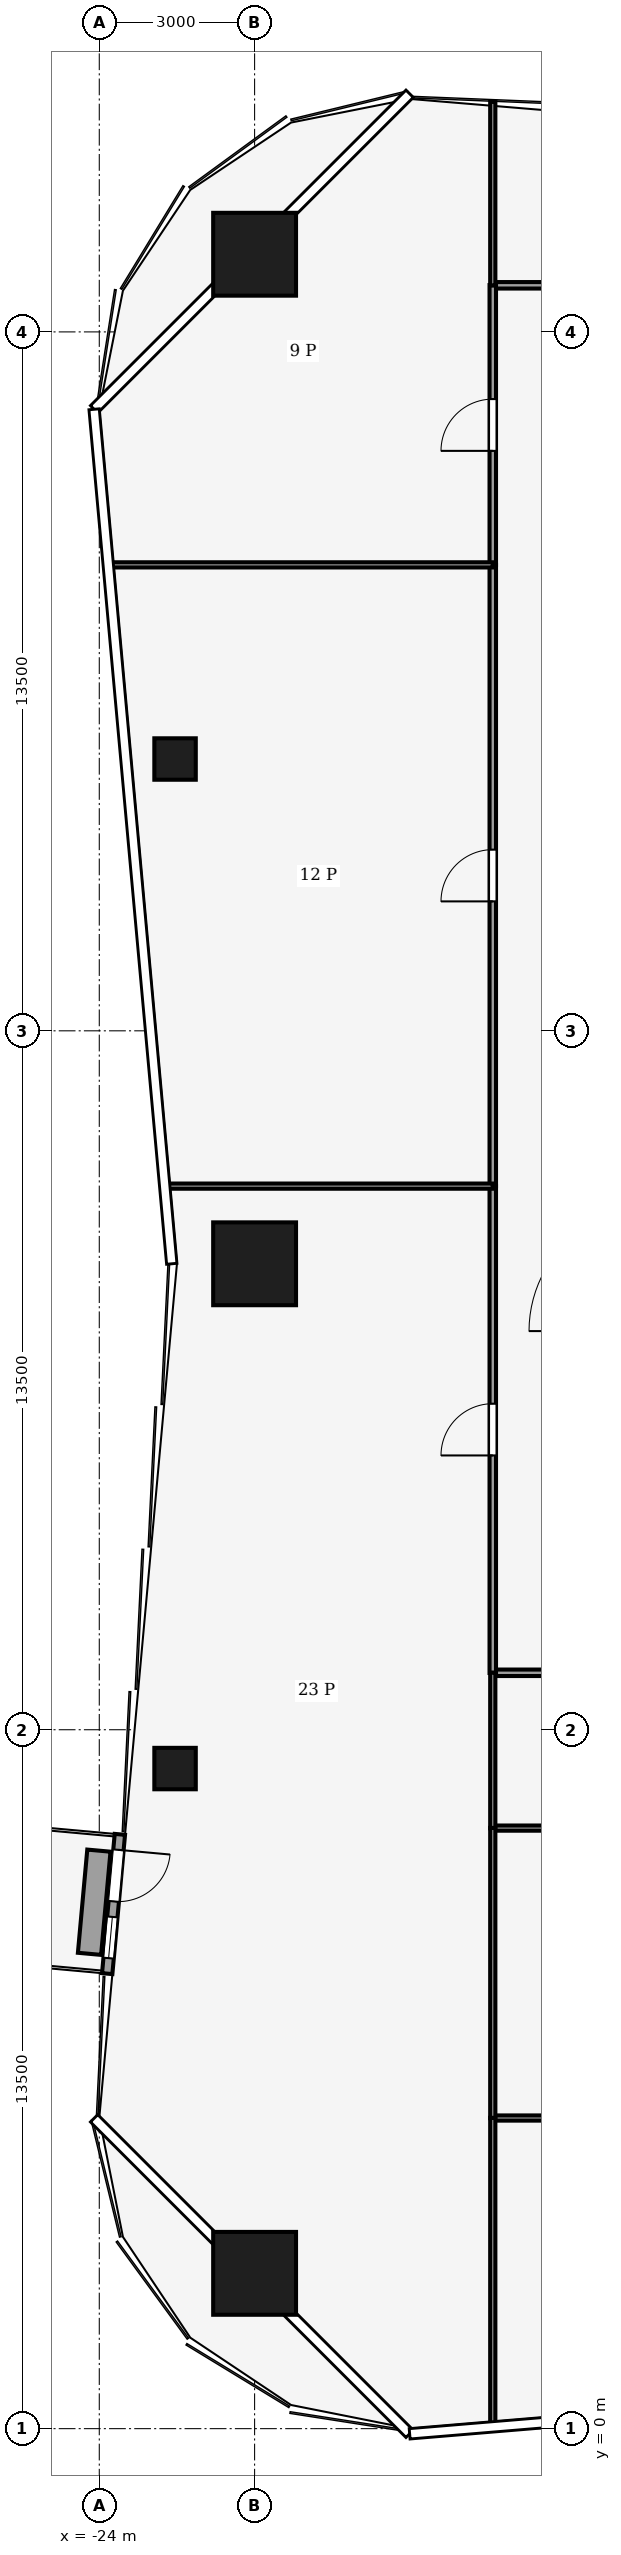
"""IFC4 building model, lengths in metres.
Left out: names, types, materials, properties, quantities, classifications, styles, units other than length and angle.
Written with IfcOpenShell. Run it as: python <this file> out.ifc"""

import sys

from ifc_helpers import new_model, si_unit, direction, frame, frame_2d, origin, origin_2d, place, context, subcontext, project, spatial, rectangle, hollow_rectangle, extrude, element, fill, save


model = new_model("IFC4")
c1 = context("Model", 3, precision=1e-05, world=origin(), true_north=direction((0.0, 1.0)))
c2 = subcontext(c1, "Body", "Model", "MODEL_VIEW")
j1 = project(units=[si_unit("LENGTHUNIT", "METRE"), si_unit("PLANEANGLEUNIT", "RADIAN")], contexts=[c1])
p1 = place(None, origin())
s1 = spatial("IfcSite", under=j1, at=p1, CompositionType="ELEMENT")
p2 = place(p1, origin())
s2 = spatial("IfcBuilding", under=s1, at=p2, CompositionType="ELEMENT")
p3 = place(p2, frame((0.0, 0.0, 34.0)))
s3 = spatial("IfcBuildingStorey", under=s2, at=p3, CompositionType="ELEMENT", Elevation=34.0)
for number, where, z_axis, x_axis in (
    (1, (-21.0, 42.0, 0.0), (0.0, 0.0, 1.0), (1.0, 0.0, 0.0)),
    (2, (-21.0, 3.0, 0.0), (0.0, 0.0, 1.0), (1.0, 0.0, 0.0)),
    (3, (-21.0, 22.5, 0.0), (0.0, 0.0, 1.0), (1.0, 0.0, 0.0)),
):
    element("IfcColumn", number, at=place(p3, frame(where, z_axis=z_axis, x_axis=x_axis)), inside=s3, PredefinedType="COLUMN", context=c2, shape_type="SweptSolid", body=[
        extrude(hollow_rectangle(XDim=1.6, YDim=1.6, WallThickness=0.09, at=origin_2d()), origin(), (0.0, 0.0, 1.0), 4.0),
    ])
for number, where, z_axis, x_axis in (
    (4, (-22.536, 12.75, 0.0), (0.0, 0.0, 1.0), (1.0, 0.0, 0.0)),
    (5, (-22.536, 32.25, 0.0), (0.0, 0.0, 1.0), (1.0, 0.0, 0.0)),
):
    element("IfcColumn", number, at=place(p3, frame(where, z_axis=z_axis, x_axis=x_axis)), inside=s3, PredefinedType="COLUMN", context=c2, shape_type="SweptSolid", body=[
        extrude(hollow_rectangle(XDim=0.8, YDim=0.8, WallThickness=0.04, at=origin_2d()), origin(), (0.0, 0.0, 1.0), 4.0),
    ])
p4 = place(p3, frame((-23.602, 11.479, 0.0), z_axis=(0.0, 0.0, 1.0), x_axis=(-0.090552042494, -0.995891724838, 0.0)))
e6 = element("IfcWall", 6, at=p4, inside=s3, PredefinedType="SOLIDWALL", context=c2, shape_type="SweptSolid", body=[
    extrude(rectangle(XDim=2.701, YDim=0.2, at=frame_2d((1.351, 0.0))), origin(), (0.0, 0.0, 1.0), 3.65),
])
p5 = place(p4, frame((0.3, 0.0, 0.0)))
e7 = element("IfcOpeningElement", 7, at=p5, cuts=e6, PredefinedType="OPENING", context=c2, shape_type="SweptSolid", body=[
    extrude(rectangle(XDim=1.0, YDim=2.1, at=frame_2d((0.5, 1.05))), frame((0.0, 0.11, 0.0), z_axis=(0.0, -1.0, 0.0), x_axis=(1.0, 0.0, 0.0)), (0.0, 0.0, 1.0), 0.22),
])
p6 = place(p4, frame((1.601, 0.0, 0.9)))
e8 = element("IfcOpeningElement", 8, at=p6, cuts=e6, PredefinedType="OPENING", context=c2, shape_type="SweptSolid", body=[
    extrude(rectangle(XDim=0.8, YDim=1.2, at=frame_2d((0.4, 0.6))), frame((0.0, 0.11, 0.0), z_axis=(0.0, -1.0, 0.0), x_axis=(1.0, 0.0, 0.0)), (0.0, 0.0, 1.0), 0.22),
])
p7 = place(p3, frame((-24.008, 11.165, 0.0), z_axis=(0.0, 0.0, 1.0), x_axis=(-0.090513748512, -0.995895205998, 0.0)))
e9 = element("IfcWall", 9, at=p7, inside=s3, PredefinedType="USERDEFINED", context=c2, shape_type="SweptSolid", body=[
    extrude(rectangle(XDim=2.001, YDim=0.45, at=frame_2d((1.001, 0.0))), origin(), (0.0, 0.0, 1.0), 0.4),
])
p8 = place(p3, frame((-9.0, 14.6, 0.0), z_axis=(0.0, 0.0, 1.0), x_axis=(-1.0, 0.0, 0.0)))
e10 = element("IfcWall", 10, at=p8, inside=s3, PredefinedType="PARTITIONING", context=c2, shape_type="SweptSolid", body=[
    extrude(rectangle(XDim=7.4, YDim=0.125, at=frame_2d((3.7, 0.0))), origin(), (0.0, 0.0, 1.0), 3.29),
])
p9 = place(p8, frame((3.2, 0.0, 0.0)))
e11 = element("IfcOpeningElement", 11, at=p9, cuts=e10, PredefinedType="OPENING", context=c2, shape_type="SweptSolid", body=[
    extrude(rectangle(XDim=1.0, YDim=2.1, at=frame_2d((0.5, 1.05))), frame((0.0, 0.073, 0.0), z_axis=(0.0, -1.0, 0.0), x_axis=(1.0, 0.0, 0.0)), (0.0, 0.0, 1.0), 0.145),
])
p10 = place(p3, frame((-16.4, 41.4, 0.0), z_axis=(0.0, 0.0, 1.0), x_axis=(1.0, 0.0, 0.0)))
e12 = element("IfcWall", 12, at=p10, inside=s3, PredefinedType="PARTITIONING", context=c2, shape_type="SweptSolid", body=[
    extrude(rectangle(XDim=10.4, YDim=0.125, at=frame_2d((5.2, 0.0))), origin(), (0.0, 0.0, 1.0), 3.54),
])
p11 = place(p10, frame((7.5, 0.0, 0.0)))
e13 = element("IfcOpeningElement", 13, at=p11, cuts=e12, PredefinedType="OPENING", context=c2, shape_type="SweptSolid", body=[
    extrude(rectangle(XDim=1.0, YDim=2.1, at=frame_2d((0.5, 1.05))), frame((0.0, 0.073, 0.0), z_axis=(0.0, -1.0, 0.0), x_axis=(1.0, 0.0, 0.0)), (0.0, 0.0, 1.0), 0.145),
])
p12 = place(p3, frame((-16.4, 14.596, 0.0), z_axis=(0.0, 0.0, 1.0), x_axis=(0.0, 1.0, 0.0)))
e14 = element("IfcWall", 14, at=p12, inside=s3, PredefinedType="PARTITIONING", context=c2, shape_type="SweptSolid", body=[
    extrude(rectangle(XDim=9.404, YDim=0.125, at=frame_2d((4.702, 0.0))), origin(), (0.0, 0.0, 1.0), 3.14),
])
p13 = place(p12, frame((4.202, 0.0, 0.0)))
e15 = element("IfcOpeningElement", 15, at=p13, cuts=e14, PredefinedType="OPENING", context=c2, shape_type="SweptSolid", body=[
    extrude(rectangle(XDim=1.0, YDim=2.1, at=frame_2d((0.5, 1.05))), frame((0.0, 0.073, 0.0), z_axis=(0.0, -1.0, 0.0), x_axis=(1.0, 0.0, 0.0)), (0.0, 0.0, 1.0), 0.145),
])
p14 = place(p3, frame((-16.4, 24.0, 0.0), z_axis=(0.0, 0.0, 1.0), x_axis=(0.0, 1.0, 0.0)))
e16 = element("IfcWall", 16, at=p14, inside=s3, PredefinedType="PARTITIONING", context=c2, shape_type="SweptSolid", body=[
    extrude(rectangle(XDim=12.0, YDim=0.125, at=frame_2d((6.0, 0.0))), origin(), (0.0, 0.0, 1.0), 3.48),
])
p15 = place(p14, frame((5.5, 0.0, 0.0)))
e17 = element("IfcOpeningElement", 17, at=p15, cuts=e16, PredefinedType="OPENING", context=c2, shape_type="SweptSolid", body=[
    extrude(rectangle(XDim=1.0, YDim=2.1, at=frame_2d((0.5, 1.05))), frame((0.0, 0.073, 0.0), z_axis=(0.0, -1.0, 0.0), x_axis=(1.0, 0.0, 0.0)), (0.0, 0.0, 1.0), 0.145),
])
p16 = place(p3, frame((-16.4, 36.0, 0.0), z_axis=(0.0, 0.0, 1.0), x_axis=(0.0, 1.0, 0.0)))
e18 = element("IfcWall", 18, at=p16, inside=s3, PredefinedType="PARTITIONING", context=c2, shape_type="SweptSolid", body=[
    extrude(rectangle(XDim=5.404, YDim=0.125, at=frame_2d((2.702, 0.0))), origin(), (0.0, 0.0, 1.0), 3.14),
])
p17 = place(p16, frame((2.202, 0.0, 0.0)))
e19 = element("IfcOpeningElement", 19, at=p17, cuts=e18, PredefinedType="OPENING", context=c2, shape_type="SweptSolid", body=[
    extrude(rectangle(XDim=1.0, YDim=2.1, at=frame_2d((0.5, 1.05))), frame((0.0, 0.073, 0.0), z_axis=(0.0, -1.0, 0.0), x_axis=(1.0, 0.0, 0.0)), (0.0, 0.0, 1.0), 0.145),
])
p18 = place(p3, frame((-8.996, 11.6, 0.0), z_axis=(0.0, 0.0, 1.0), x_axis=(-1.0, 0.0, 0.0)))
e20 = element("IfcWall", 20, at=p18, inside=s3, PredefinedType="PARTITIONING", context=c2, shape_type="SweptSolid", body=[
    extrude(rectangle(XDim=7.404, YDim=0.1, at=frame_2d((3.702, 0.0))), origin(), (0.0, 0.0, 1.0), 3.29),
])
p19 = place(p18, frame((3.202, 0.0, 0.0)))
e21 = element("IfcOpeningElement", 21, at=p19, cuts=e20, PredefinedType="OPENING", context=c2, shape_type="SweptSolid", body=[
    extrude(rectangle(XDim=1.0, YDim=2.1, at=frame_2d((0.5, 1.05))), frame((0.0, 0.06, 0.0), z_axis=(0.0, -1.0, 0.0), x_axis=(1.0, 0.0, 0.0)), (0.0, 0.0, 1.0), 0.12),
])
p20 = place(p3, frame((-16.4, 14.604, 0.0), z_axis=(0.0, 0.0, 1.0), x_axis=(0.0, -1.0, 0.0)))
e22 = element("IfcWall", 22, at=p20, inside=s3, PredefinedType="PARTITIONING", context=c2, shape_type="SweptSolid", body=[
    extrude(rectangle(XDim=3.008, YDim=0.1, at=frame_2d((1.504, 0.0))), origin(), (0.0, 0.0, 1.0), 3.87),
])
p21 = place(p3, frame((-6.0, 6.0, 0.0), z_axis=(0.0, 0.0, 1.0), x_axis=(-1.0, 0.0, 0.0)))
e23 = element("IfcWall", 23, at=p21, inside=s3, PredefinedType="PARTITIONING", context=c2, shape_type="SweptSolid", body=[
    extrude(rectangle(XDim=10.4, YDim=0.1, at=frame_2d((5.2, 0.0))), origin(), (0.0, 0.0, 1.0), 3.29),
])
p22 = place(p21, frame((4.7, 0.0, 0.0)))
e24 = element("IfcOpeningElement", 24, at=p22, cuts=e23, PredefinedType="OPENING", context=c2, shape_type="SweptSolid", body=[
    extrude(rectangle(XDim=1.0, YDim=2.1, at=frame_2d((0.5, 1.05))), frame((0.0, 0.06, 0.0), z_axis=(0.0, -1.0, 0.0), x_axis=(1.0, 0.0, 0.0)), (0.0, 0.0, 1.0), 0.12),
])
p23 = place(p3, frame((-16.4, 11.604, 0.0), z_axis=(0.0, 0.0, 1.0), x_axis=(0.0, -1.0, 0.0)))
e25 = element("IfcWall", 25, at=p23, inside=s3, PredefinedType="PARTITIONING", context=c2, shape_type="SweptSolid", body=[
    extrude(rectangle(XDim=5.608, YDim=0.1, at=frame_2d((2.804, 0.0))), origin(), (0.0, 0.0, 1.0), 3.87),
])
p24 = place(p3, frame((-16.4, 6.004, 0.0), z_axis=(0.0, 0.0, 1.0), x_axis=(0.0, -1.0, 0.0)))
e26 = element("IfcWall", 26, at=p24, inside=s3, PredefinedType="PARTITIONING", context=c2, shape_type="SweptSolid", body=[
    extrude(rectangle(XDim=5.951, YDim=0.1, at=frame_2d((2.975, 0.0))), origin(), (0.0, 0.0, 1.0), 3.04),
])
p25 = place(p3, frame((-16.4, 44.947, 0.0), z_axis=(0.0, 0.0, 1.0), x_axis=(0.0, -1.0, 0.0)))
e27 = element("IfcWall", 27, at=p25, inside=s3, PredefinedType="PARTITIONING", context=c2, shape_type="SweptSolid", body=[
    extrude(rectangle(XDim=3.551, YDim=0.1, at=frame_2d((1.775, 0.0))), origin(), (0.0, 0.0, 1.0), 3.04),
])
p26 = place(p3, frame((-16.4, 24.0, 0.0), z_axis=(0.0, 0.0, 1.0), x_axis=(-1.0, 0.0, 0.0)))
e28 = element("IfcWall", 28, at=p26, inside=s3, PredefinedType="PARTITIONING", context=c2, shape_type="SweptSolid", body=[
    extrude(rectangle(XDim=6.316, YDim=0.1, at=frame_2d((3.158, 0.0))), origin(), (0.0, 0.0, 1.0), 3.04),
])
p27 = place(p3, frame((-16.4, 36.0, 0.0), z_axis=(0.0, 0.0, 1.0), x_axis=(-1.0, 0.0, 0.0)))
e29 = element("IfcWall", 29, at=p27, inside=s3, PredefinedType="PARTITIONING", context=c2, shape_type="SweptSolid", body=[
    extrude(rectangle(XDim=7.407, YDim=0.1, at=frame_2d((3.704, 0.0))), origin(), (0.0, 0.0, 1.0), 3.04),
])
p28 = place(p5, origin())
e30 = element("IfcDoor", 30, at=p28, inside=s3, OperationType="SINGLE_SWING_LEFT", PredefinedType="DOOR", context=c2, shape_type="SweptSolid", body=[
    extrude(rectangle(XDim=1.0, YDim=2.1, at=frame_2d((0.5, 1.05))), frame((0.0, 0.025, 0.0), z_axis=(0.0, -1.0, 0.0), x_axis=(1.0, 0.0, 0.0)), (0.0, 0.0, 1.0), 0.05),
])
fill(e7, e30)
p29 = place(p6, origin())
e31 = element("IfcWindow", 31, at=p29, inside=s3, PartitioningType="SINGLE_PANEL", PredefinedType="WINDOW", context=c2, shape_type="SweptSolid", body=[
    extrude(rectangle(XDim=0.8, YDim=1.2, at=frame_2d((0.4, 0.6))), frame((0.0, 0.03, 0.0), z_axis=(0.0, -1.0, 0.0), x_axis=(1.0, 0.0, 0.0)), (0.0, 0.0, 1.0), 0.06),
])
fill(e8, e31)
p30 = place(p13, origin())
e32 = element("IfcDoor", 32, at=p30, inside=s3, OperationType="SINGLE_SWING_RIGHT", PredefinedType="DOOR", context=c2, shape_type="SweptSolid", body=[
    extrude(rectangle(XDim=1.0, YDim=2.1, at=frame_2d((0.5, 1.05))), frame((0.0, 0.025, 0.0), z_axis=(0.0, -1.0, 0.0), x_axis=(1.0, 0.0, 0.0)), (0.0, 0.0, 1.0), 0.05),
])
fill(e15, e32)
p31 = place(p15, origin())
e33 = element("IfcDoor", 33, at=p31, inside=s3, OperationType="SINGLE_SWING_LEFT", PredefinedType="DOOR", context=c2, shape_type="SweptSolid", body=[
    extrude(rectangle(XDim=1.0, YDim=2.1, at=frame_2d((0.5, 1.05))), frame((0.0, 0.025, 0.0), z_axis=(0.0, -1.0, 0.0), x_axis=(1.0, 0.0, 0.0)), (0.0, 0.0, 1.0), 0.05),
])
fill(e17, e33)
p32 = place(p17, origin())
e34 = element("IfcDoor", 34, at=p32, inside=s3, OperationType="SINGLE_SWING_RIGHT", PredefinedType="DOOR", context=c2, shape_type="SweptSolid", body=[
    extrude(rectangle(XDim=1.0, YDim=2.1, at=frame_2d((0.5, 1.05))), frame((0.0, 0.025, 0.0), z_axis=(0.0, -1.0, 0.0), x_axis=(1.0, 0.0, 0.0)), (0.0, 0.0, 1.0), 0.05),
])
fill(e19, e34)
save(model, sys.argv[1])
